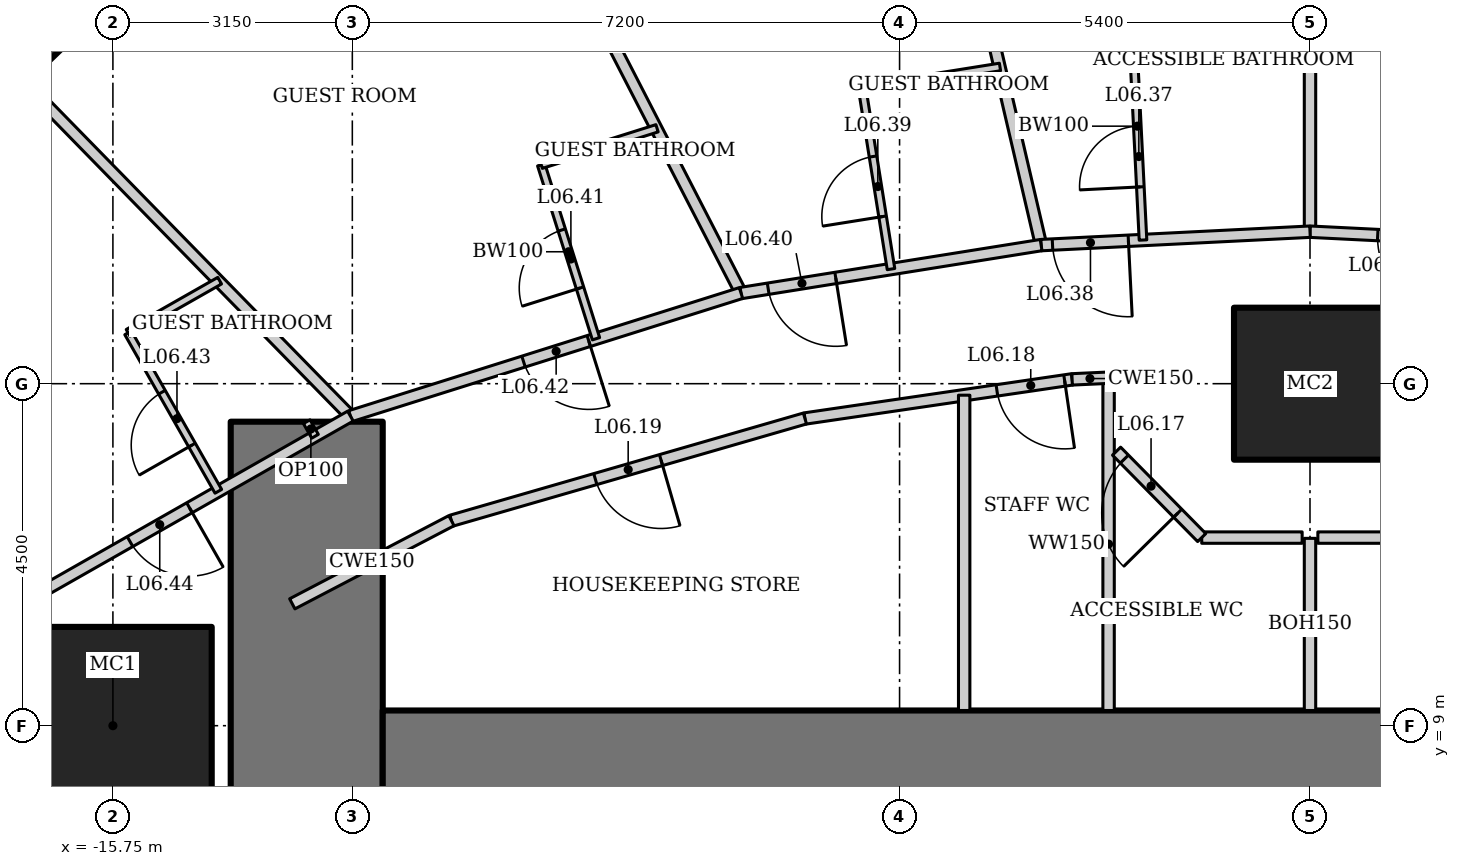
"""IFC4 building model, lengths in metres.
Left out: names, types, materials, properties, quantities, classifications, styles, units other than length and angle.
Written with IfcOpenShell. Run it as: python <this file> out.ifc"""

import sys

from ifc_helpers import new_model, si_unit, direction, frame, frame_2d, origin, origin_2d, place, context, subcontext, project, spatial, rectangle, hollow_rectangle, extrude, element, fill, save


model = new_model("IFC4")
c1 = context("Model", 3, precision=1e-05, world=origin(), true_north=direction((0.0, 1.0)))
c2 = subcontext(c1, "Body", "Model", "MODEL_VIEW")
j1 = project(units=[si_unit("LENGTHUNIT", "METRE"), si_unit("PLANEANGLEUNIT", "RADIAN")], contexts=[c1])
p1 = place(None, origin())
s1 = spatial("IfcSite", under=j1, at=p1, CompositionType="ELEMENT")
p2 = place(p1, origin())
s2 = spatial("IfcBuilding", under=s1, at=p2, CompositionType="ELEMENT")
p3 = place(p2, frame((0.0, 0.0, 37.0)))
s3 = spatial("IfcBuildingStorey", under=s2, at=p3, CompositionType="ELEMENT", Elevation=37.0)
p4 = place(p3, frame((0.0, 13.5, 0.0), z_axis=(0.0, 0.0, 1.0), x_axis=(1.0, 0.0, 0.0)))
e1 = element("IfcColumn", 1, at=p4, inside=s3, PredefinedType="COLUMN", context=c2, shape_type="SweptSolid", body=[
    extrude(hollow_rectangle(XDim=2.0, YDim=2.0, WallThickness=0.17, at=origin_2d()), origin(), (0.0, 0.0, 1.0), 3.6),
])
p5 = place(p3, frame((-15.75, 9.0, 0.0), z_axis=(0.0, 0.0, 1.0), x_axis=(1.0, 0.0, 0.0)))
e2 = element("IfcColumn", 2, at=p5, inside=s3, PredefinedType="COLUMN", context=c2, shape_type="SweptSolid", body=[
    extrude(hollow_rectangle(XDim=2.6, YDim=2.6, WallThickness=0.13, at=origin_2d()), origin(), (0.0, 0.0, 1.0), 3.6),
])
p6 = place(p3, frame((-17.291, 17.905, 0.0), z_axis=(0.0, 0.0, 1.0), x_axis=(0.719339800339, 0.694658370459, 0.0)))
e3 = element("IfcColumn", 3, at=p6, inside=s3, PredefinedType="COLUMN", context=c2, shape_type="SweptSolid", body=[
    extrude(hollow_rectangle(XDim=1.2, YDim=1.2, WallThickness=0.1, at=origin_2d()), origin(), (0.0, 0.0, 1.0), 3.6),
])
p7 = place(p3, frame((-13.2, 13.0, 0.0), z_axis=(0.0, 0.0, 1.0), x_axis=(0.0, -1.0, 0.0)))
e4 = element("IfcWall", 4, at=p7, inside=s3, PredefinedType="SHEAR", context=c2, shape_type="SweptSolid", body=[
    extrude(rectangle(XDim=26.0, YDim=2.0, at=frame_2d((13.0, 0.0))), origin(), (0.0, 0.0, 1.0), 3.6),
])
p8 = place(p7, frame((12.1, 0.0, 0.0)))
e5 = element("IfcOpeningElement", 5, at=p8, cuts=e4, PredefinedType="OPENING", context=c2, shape_type="SweptSolid", body=[
    extrude(rectangle(XDim=1.8, YDim=2.1, at=frame_2d((0.9, 1.05))), frame((0.0, 1.01, 0.0), z_axis=(0.0, -1.0, 0.0), x_axis=(1.0, 0.0, 0.0)), (0.0, 0.0, 1.0), 2.02),
])
p9 = place(p3, frame((12.2, 8.0, 0.0), z_axis=(0.0, 0.0, 1.0), x_axis=(-1.0, 0.0, 0.0)))
e6 = element("IfcWall", 6, at=p9, inside=s3, PredefinedType="SHEAR", context=c2, shape_type="SweptSolid", body=[
    extrude(rectangle(XDim=24.4, YDim=2.4, at=frame_2d((12.2, 0.0))), origin(), (0.0, 0.0, 1.0), 3.6),
])
p10 = place(p3, frame((0.0, 22.825, 0.0), z_axis=(0.0, 0.0, 1.0), x_axis=(0.0, -1.0, 0.0)))
e7 = element("IfcWall", 7, at=p10, inside=s3, PredefinedType="PARTITIONING", context=c2, shape_type="SweptSolid", body=[
    extrude(rectangle(XDim=7.325, YDim=0.15, at=frame_2d((3.662, 0.0))), origin(), (0.0, 0.0, 1.0), 2.924),
])
p11 = place(p3, frame((-5.211, 22.496, 0.0), z_axis=(0.0, 0.0, 1.0), x_axis=(0.227195035564, -0.973849277771, 0.0)))
e8 = element("IfcWall", 8, at=p11, inside=s3, PredefinedType="PARTITIONING", context=c2, shape_type="SweptSolid", body=[
    extrude(rectangle(XDim=7.365, YDim=0.15, at=frame_2d((3.683, 0.0))), origin(), (0.0, 0.0, 1.0), 2.767),
])
p12 = place(p3, frame((-10.912, 21.346, 0.0), z_axis=(0.0, 0.0, 1.0), x_axis=(0.45777845119, -0.889066302154, 0.0)))
e9 = element("IfcWall", 9, at=p12, inside=s3, PredefinedType="PARTITIONING", context=c2, shape_type="SweptSolid", body=[
    extrude(rectangle(XDim=7.483, YDim=0.15, at=frame_2d((3.742, 0.0))), origin(), (0.0, 0.0, 1.0), 2.528),
])
p13 = place(p3, frame((-17.97, 18.542, 0.0), z_axis=(0.0, 0.0, 1.0), x_axis=(0.699032031211, -0.715090357467, 0.0)))
e10 = element("IfcWall", 10, at=p13, inside=s3, PredefinedType="PARTITIONING", context=c2, shape_type="SweptSolid", body=[
    extrude(rectangle(XDim=7.647, YDim=0.15, at=frame_2d((3.824, 0.0))), origin(), (0.0, 0.0, 1.0), 2.528),
])
p14 = place(p3, frame((3.538, 15.323, 0.0), z_axis=(0.0, 0.0, 1.0), x_axis=(-0.998754057167, 0.049903239295, 0.0)))
e11 = element("IfcWall", 11, at=p14, inside=s3, PredefinedType="PARTITIONING", context=c2, shape_type="SweptSolid", body=[
    extrude(rectangle(XDim=3.542, YDim=0.15, at=frame_2d((1.771, 0.0))), origin(), (0.0, 0.0, 1.0), 3.45),
])
p15 = place(p14, frame((1.75, 0.0, 0.0)))
e12 = element("IfcOpeningElement", 12, at=p15, cuts=e11, PredefinedType="OPENING", context=c2, shape_type="SweptSolid", body=[
    extrude(rectangle(XDim=0.9, YDim=2.1, at=frame_2d((0.45, 1.05))), frame((0.0, 0.085, 0.0), z_axis=(0.0, -1.0, 0.0), x_axis=(1.0, 0.0, 0.0)), (0.0, 0.0, 1.0), 0.17),
])
p16 = place(p3, frame((0.0, 15.5, 0.0), z_axis=(0.0, 0.0, 1.0), x_axis=(-0.998754057167, -0.049903239295, 0.0)))
e13 = element("IfcWall", 13, at=p16, inside=s3, PredefinedType="PARTITIONING", context=c2, shape_type="SweptSolid", body=[
    extrude(rectangle(XDim=3.542, YDim=0.15, at=frame_2d((1.771, 0.0))), origin(), (0.0, 0.0, 1.0), 3.45),
])
p17 = place(p16, frame((2.392, 0.0, 0.0)))
e14 = element("IfcOpeningElement", 14, at=p17, cuts=e13, PredefinedType="OPENING", context=c2, shape_type="SweptSolid", body=[
    extrude(rectangle(XDim=1.0, YDim=2.1, at=frame_2d((0.5, 1.05))), frame((0.0, 0.085, 0.0), z_axis=(0.0, -1.0, 0.0), x_axis=(1.0, 0.0, 0.0)), (0.0, 0.0, 1.0), 0.17),
])
p18 = place(p3, frame((-3.538, 15.323, 0.0), z_axis=(0.0, 0.0, 1.0), x_axis=(-0.987475660646, -0.157771415761, 0.0)))
e15 = element("IfcWall", 15, at=p18, inside=s3, PredefinedType="PARTITIONING", context=c2, shape_type="SweptSolid", body=[
    extrude(rectangle(XDim=3.999, YDim=0.15, at=frame_2d((1.999, 0.0))), origin(), (0.0, 0.0, 1.0), 3.45),
])
p19 = place(p18, frame((2.736, 0.0, 0.0)))
e16 = element("IfcOpeningElement", 16, at=p19, cuts=e15, PredefinedType="OPENING", context=c2, shape_type="SweptSolid", body=[
    extrude(rectangle(XDim=0.9, YDim=2.1, at=frame_2d((0.45, 1.05))), frame((0.0, 0.085, 0.0), z_axis=(0.0, -1.0, 0.0), x_axis=(1.0, 0.0, 0.0)), (0.0, 0.0, 1.0), 0.17),
])
p20 = place(p3, frame((-7.486, 14.692, 0.0), z_axis=(0.0, 0.0, 1.0), x_axis=(-0.953774229808, -0.30052407317, 0.0)))
e17 = element("IfcWall", 17, at=p20, inside=s3, PredefinedType="PARTITIONING", context=c2, shape_type="SweptSolid", body=[
    extrude(rectangle(XDim=5.388, YDim=0.15, at=frame_2d((2.694, 0.0))), origin(), (0.0, 0.0, 1.0), 3.45),
])
p21 = place(p20, frame((2.1, 0.0, 0.0)))
e18 = element("IfcOpeningElement", 18, at=p21, cuts=e17, PredefinedType="OPENING", context=c2, shape_type="SweptSolid", body=[
    extrude(rectangle(XDim=0.9, YDim=2.1, at=frame_2d((0.45, 1.05))), frame((0.0, 0.085, 0.0), z_axis=(0.0, -1.0, 0.0), x_axis=(1.0, 0.0, 0.0)), (0.0, 0.0, 1.0), 0.17),
])
p22 = place(p3, frame((-12.625, 13.073, 0.0), z_axis=(0.0, 0.0, 1.0), x_axis=(-0.86907565943, -0.494679187136, 0.0)))
e19 = element("IfcWall", 19, at=p22, inside=s3, PredefinedType="PARTITIONING", context=c2, shape_type="SweptSolid", body=[
    extrude(rectangle(XDim=5.911, YDim=0.15, at=frame_2d((2.955, 0.0))), origin(), (0.0, 0.0, 1.0), 3.45),
])
p23 = place(p22, frame((2.437, 0.0, 0.0)))
e20 = element("IfcOpeningElement", 20, at=p23, cuts=e19, PredefinedType="OPENING", context=c2, shape_type="SweptSolid", body=[
    extrude(rectangle(XDim=0.9, YDim=2.1, at=frame_2d((0.45, 1.05))), frame((0.0, 0.085, 0.0), z_axis=(0.0, -1.0, 0.0), x_axis=(1.0, 0.0, 0.0)), (0.0, 0.0, 1.0), 0.17),
])
p24 = place(p3, frame((-3.13, 13.557, 0.0), z_axis=(0.0, 0.0, 1.0), x_axis=(-0.989443047021, -0.14492224364, 0.0)))
e21 = element("IfcWall", 21, at=p24, inside=s3, PredefinedType="PARTITIONING", context=c2, shape_type="SweptSolid", body=[
    extrude(rectangle(XDim=3.553, YDim=0.15, at=frame_2d((1.776, 0.0))), origin(), (0.0, 0.0, 1.0), 3.45),
])
p25 = place(p24, frame((0.1, 0.0, 0.0)))
e22 = element("IfcOpeningElement", 22, at=p25, cuts=e21, PredefinedType="OPENING", context=c2, shape_type="SweptSolid", body=[
    extrude(rectangle(XDim=0.9, YDim=2.1, at=frame_2d((0.45, 1.05))), frame((0.0, 0.085, 0.0), z_axis=(0.0, -1.0, 0.0), x_axis=(1.0, 0.0, 0.0)), (0.0, 0.0, 1.0), 0.17),
])
p26 = place(p3, frame((-6.645, 13.042, 0.0), z_axis=(0.0, 0.0, 1.0), x_axis=(-0.960678318068, -0.277663770041, 0.0)))
e23 = element("IfcWall", 23, at=p26, inside=s3, PredefinedType="PARTITIONING", context=c2, shape_type="SweptSolid", body=[
    extrude(rectangle(XDim=4.841, YDim=0.15, at=frame_2d((2.421, 0.0))), origin(), (0.0, 0.0, 1.0), 3.45),
])
p27 = place(p26, frame((1.971, 0.0, 0.0)))
e24 = element("IfcOpeningElement", 24, at=p27, cuts=e23, PredefinedType="OPENING", context=c2, shape_type="SweptSolid", body=[
    extrude(rectangle(XDim=0.9, YDim=2.1, at=frame_2d((0.45, 1.05))), frame((0.0, 0.085, 0.0), z_axis=(0.0, -1.0, 0.0), x_axis=(1.0, 0.0, 0.0)), (0.0, 0.0, 1.0), 0.17),
])
p28 = place(p3, frame((-2.65, 9.2, 0.0), z_axis=(0.0, 0.0, 1.0), x_axis=(0.0, 1.0, 0.0)))
e25 = element("IfcWall", 25, at=p28, inside=s3, PredefinedType="SOLIDWALL", context=c2, shape_type="SweptSolid", body=[
    extrude(rectangle(XDim=4.379, YDim=0.15, at=frame_2d((2.189, 0.0))), origin(), (0.0, 0.0, 1.0), 2.767),
])
p29 = place(p3, frame((-4.55, 9.2, 0.0), z_axis=(0.0, 0.0, 1.0), x_axis=(0.0, 1.0, 0.0)))
e26 = element("IfcWall", 26, at=p29, inside=s3, PredefinedType="SOLIDWALL", context=c2, shape_type="SweptSolid", body=[
    extrude(rectangle(XDim=4.149, YDim=0.15, at=frame_2d((2.074, 0.0))), origin(), (0.0, 0.0, 1.0), 3.45),
])
p30 = place(p3, frame((-2.197, 15.39, 0.0), z_axis=(0.0, 0.0, 1.0), x_axis=(-0.049888907753, 0.998754773147, 0.0)))
e27 = element("IfcWall", 27, at=p30, inside=s3, PredefinedType="PARTITIONING", context=c2, shape_type="SweptSolid", body=[
    extrude(rectangle(XDim=3.0, YDim=0.1, at=frame_2d((1.5, 0.0))), origin(), (0.0, 0.0, 1.0), 3.45),
])
p31 = place(p30, frame((0.7, 0.0, 0.0)))
e28 = element("IfcOpeningElement", 28, at=p31, cuts=e27, PredefinedType="OPENING", context=c2, shape_type="SweptSolid", body=[
    extrude(rectangle(XDim=0.8, YDim=2.1, at=frame_2d((0.4, 1.05))), frame((0.0, 0.06, 0.0), z_axis=(0.0, -1.0, 0.0), x_axis=(1.0, 0.0, 0.0)), (0.0, 0.0, 1.0), 0.12),
])
p32 = place(p3, frame((-5.513, 15.008, 0.0), z_axis=(0.0, 0.0, 1.0), x_axis=(-0.157780217218, 0.987474254376, 0.0)))
e29 = element("IfcWall", 29, at=p32, inside=s3, PredefinedType="PARTITIONING", context=c2, shape_type="SweptSolid", body=[
    extrude(rectangle(XDim=2.4, YDim=0.1, at=frame_2d((1.2, 0.0))), origin(), (0.0, 0.0, 1.0), 3.45),
])
p33 = place(p32, frame((0.7, 0.0, 0.0)))
e30 = element("IfcOpeningElement", 30, at=p33, cuts=e29, PredefinedType="OPENING", context=c2, shape_type="SweptSolid", body=[
    extrude(rectangle(XDim=0.8, YDim=2.1, at=frame_2d((0.4, 1.05))), frame((0.0, 0.06, 0.0), z_axis=(0.0, -1.0, 0.0), x_axis=(1.0, 0.0, 0.0)), (0.0, 0.0, 1.0), 0.12),
])
p34 = place(p3, frame((-5.891, 17.378, 0.0), z_axis=(0.0, 0.0, 1.0), x_axis=(0.987478784284, 0.157751863976, 0.0)))
e31 = element("IfcWall", 31, at=p34, inside=s3, PredefinedType="PARTITIONING", context=c2, shape_type="SweptSolid", body=[
    extrude(rectangle(XDim=1.835, YDim=0.1, at=frame_2d((0.918, 0.0))), origin(), (0.0, 0.0, 1.0), 3.45),
])
p35 = place(p3, frame((-9.394, 14.091, 0.0), z_axis=(0.0, 0.0, 1.0), x_axis=(-0.30049839721, 0.953782319649, 0.0)))
e32 = element("IfcWall", 32, at=p35, inside=s3, PredefinedType="PARTITIONING", context=c2, shape_type="SweptSolid", body=[
    extrude(rectangle(XDim=2.4, YDim=0.1, at=frame_2d((1.2, 0.0))), origin(), (0.0, 0.0, 1.0), 3.45),
])
p36 = place(p35, frame((0.7, 0.0, 0.0)))
e33 = element("IfcOpeningElement", 33, at=p36, cuts=e32, PredefinedType="OPENING", context=c2, shape_type="SweptSolid", body=[
    extrude(rectangle(XDim=0.8, YDim=2.1, at=frame_2d((0.4, 1.05))), frame((0.0, 0.06, 0.0), z_axis=(0.0, -1.0, 0.0), x_axis=(1.0, 0.0, 0.0)), (0.0, 0.0, 1.0), 0.12),
])
p37 = place(p3, frame((-10.115, 16.38, 0.0), z_axis=(0.0, 0.0, 1.0), x_axis=(0.953764923986, 0.300553605492, 0.0)))
e34 = element("IfcWall", 34, at=p37, inside=s3, PredefinedType="PARTITIONING", context=c2, shape_type="SweptSolid", body=[
    extrude(rectangle(XDim=1.598, YDim=0.1, at=frame_2d((0.799, 0.0))), origin(), (0.0, 0.0, 1.0), 3.45),
])
p38 = place(p3, frame((-14.363, 12.084, 0.0), z_axis=(0.0, 0.0, 1.0), x_axis=(-0.494703113698, 0.869062039959, 0.0)))
e35 = element("IfcWall", 35, at=p38, inside=s3, PredefinedType="PARTITIONING", context=c2, shape_type="SweptSolid", body=[
    extrude(rectangle(XDim=2.4, YDim=0.1, at=frame_2d((1.2, 0.0))), origin(), (0.0, 0.0, 1.0), 3.45),
])
p39 = place(p38, frame((0.7, 0.0, 0.0)))
e36 = element("IfcOpeningElement", 36, at=p39, cuts=e35, PredefinedType="OPENING", context=c2, shape_type="SweptSolid", body=[
    extrude(rectangle(XDim=0.8, YDim=2.1, at=frame_2d((0.4, 1.05))), frame((0.0, 0.06, 0.0), z_axis=(0.0, -1.0, 0.0), x_axis=(1.0, 0.0, 0.0)), (0.0, 0.0, 1.0), 0.12),
])
p40 = place(p3, frame((-15.55, 14.17, 0.0), z_axis=(0.0, 0.0, 1.0), x_axis=(0.869065896633, 0.494696338485, 0.0)))
e37 = element("IfcWall", 37, at=p40, inside=s3, PredefinedType="PARTITIONING", context=c2, shape_type="SweptSolid", body=[
    extrude(rectangle(XDim=1.386, YDim=0.1, at=frame_2d((0.693, 0.0))), origin(), (0.0, 0.0, 1.0), 3.45),
])
p41 = place(p3, frame((-13.2, 13.0, 0.0), z_axis=(0.0, 0.0, 1.0), x_axis=(0.49435138335, -0.869262164011, 0.0)))
e38 = element("IfcWall", 38, at=p41, inside=s3, PredefinedType="PARTITIONING", context=c2, shape_type="SweptSolid", body=[
    extrude(rectangle(XDim=0.221, YDim=0.1, at=frame_2d((0.11, 0.0))), origin(), (0.0, 0.0, 1.0), 3.45),
])
p42 = place(p3, frame((-11.296, 11.698, 0.0), z_axis=(0.0, 0.0, 1.0), x_axis=(-0.886306431218, -0.463099244203, 0.0)))
e39 = element("IfcWall", 39, at=p42, inside=s3, PredefinedType="PARTITIONING", context=c2, shape_type="SweptSolid", body=[
    extrude(rectangle(XDim=2.362, YDim=0.15, at=frame_2d((1.181, 0.0))), origin(), (0.0, 0.0, 1.0), 3.45),
])
p43 = place(p3, frame((-2.66, 13.578, 0.0), z_axis=(0.0, 0.0, 1.0), x_axis=(-0.998932929821, -0.046184431561, 0.0)))
e40 = element("IfcWall", 40, at=p43, inside=s3, PredefinedType="PARTITIONING", context=c2, shape_type="SweptSolid", body=[
    extrude(rectangle(XDim=0.47, YDim=0.15, at=frame_2d((0.235, 0.0))), origin(), (0.0, 0.0, 1.0), 3.45),
])
p44 = place(p3, frame((0.0, 9.2, 0.0), z_axis=(0.0, 0.0, 1.0), x_axis=(0.0, 1.0, 0.0)))
e41 = element("IfcWall", 41, at=p44, inside=s3, PredefinedType="PARTITIONING", context=c2, shape_type="SweptSolid", body=[
    extrude(rectangle(XDim=2.265, YDim=0.15, at=frame_2d((1.133, 0.0))), origin(), (0.0, 0.0, 1.0), 3.044),
])
for number, where, z_axis, x_axis in (
    (42, (1.425, 11.475, 0.0), (0.0, 0.0, 1.0), (-1.0, 0.0, 0.0)),
    (43, (-0.103, 11.475, 0.0), (0.0, 0.0, 1.0), (-1.0, 0.0, 0.0)),
):
    element("IfcWall", number, at=place(p3, frame(where, z_axis=z_axis, x_axis=x_axis)), inside=s3, PredefinedType="PARTITIONING", context=c2, shape_type="SweptSolid", body=[
        extrude(rectangle(XDim=1.321, YDim=0.15, at=frame_2d((0.661, 0.0))), origin(), (0.0, 0.0, 1.0), 3.45),
    ])
p45 = place(p3, frame((-1.425, 11.475, 0.0), z_axis=(0.0, 0.0, 1.0), x_axis=(-0.701810897552, 0.71236329501, 0.0)))
e44 = element("IfcWall", 44, at=p45, inside=s3, PredefinedType="PARTITIONING", context=c2, shape_type="SweptSolid", body=[
    extrude(rectangle(XDim=1.596, YDim=0.15, at=frame_2d((0.798, 0.0))), origin(), (0.0, 0.0, 1.0), 3.45),
])
p46 = place(p45, frame((0.45, 0.0, 0.0)))
e45 = element("IfcOpeningElement", 45, at=p46, cuts=e44, PredefinedType="OPENING", context=c2, shape_type="SweptSolid", body=[
    extrude(rectangle(XDim=1.0, YDim=2.1, at=frame_2d((0.5, 1.05))), frame((0.0, 0.085, 0.0), z_axis=(0.0, -1.0, 0.0), x_axis=(1.0, 0.0, 0.0)), (0.0, 0.0, 1.0), 0.17),
])
p47 = place(p3, frame((-2.545, 13.583, 0.0), z_axis=(0.0, 0.0, 1.0), x_axis=(0.998945224079, 0.045917744822, 0.0)))
e46 = element("IfcWall", 46, at=p47, inside=s3, PredefinedType="PARTITIONING", context=c2, shape_type="SweptSolid", body=[
    extrude(rectangle(XDim=0.521, YDim=0.15, at=frame_2d((0.26, 0.0))), origin(), (0.0, 0.0, 1.0), 3.45),
])
p48 = place(p46, origin())
e47 = element("IfcDoor", 47, at=p48, inside=s3, OperationType="SINGLE_SWING_LEFT", PredefinedType="DOOR", context=c2, shape_type="SweptSolid", body=[
    extrude(rectangle(XDim=1.0, YDim=2.1, at=frame_2d((0.5, 1.05))), frame((0.0, 0.025, 0.0), z_axis=(0.0, -1.0, 0.0), x_axis=(1.0, 0.0, 0.0)), (0.0, 0.0, 1.0), 0.05),
])
fill(e45, e47)
p49 = place(p25, origin())
e48 = element("IfcDoor", 48, at=p49, inside=s3, OperationType="SINGLE_SWING_LEFT", PredefinedType="DOOR", context=c2, shape_type="SweptSolid", body=[
    extrude(rectangle(XDim=0.9, YDim=2.1, at=frame_2d((0.45, 1.05))), frame((0.0, 0.025, 0.0), z_axis=(0.0, -1.0, 0.0), x_axis=(1.0, 0.0, 0.0)), (0.0, 0.0, 1.0), 0.05),
])
fill(e22, e48)
p50 = place(p27, origin())
e49 = element("IfcDoor", 49, at=p50, inside=s3, OperationType="SINGLE_SWING_LEFT", PredefinedType="DOOR", context=c2, shape_type="SweptSolid", body=[
    extrude(rectangle(XDim=0.9, YDim=2.1, at=frame_2d((0.45, 1.05))), frame((0.0, 0.025, 0.0), z_axis=(0.0, -1.0, 0.0), x_axis=(1.0, 0.0, 0.0)), (0.0, 0.0, 1.0), 0.05),
])
fill(e24, e49)
p51 = place(p15, origin())
e50 = element("IfcDoor", 50, at=p51, inside=s3, OperationType="SINGLE_SWING_LEFT", PredefinedType="DOOR", context=c2, shape_type="SweptSolid", body=[
    extrude(rectangle(XDim=0.9, YDim=2.1, at=frame_2d((0.45, 1.05))), frame((0.0, 0.025, 0.0), z_axis=(0.0, -1.0, 0.0), x_axis=(1.0, 0.0, 0.0)), (0.0, 0.0, 1.0), 0.05),
])
fill(e12, e50)
p52 = place(p31, origin())
e51 = element("IfcDoor", 51, at=p52, inside=s3, OperationType="SINGLE_SWING_LEFT", PredefinedType="DOOR", context=c2, shape_type="SweptSolid", body=[
    extrude(rectangle(XDim=0.8, YDim=2.1, at=frame_2d((0.4, 1.05))), frame((0.0, 0.025, 0.0), z_axis=(0.0, -1.0, 0.0), x_axis=(1.0, 0.0, 0.0)), (0.0, 0.0, 1.0), 0.05),
])
fill(e28, e51)
p53 = place(p17, origin())
e52 = element("IfcDoor", 52, at=p53, inside=s3, OperationType="SINGLE_SWING_LEFT", PredefinedType="DOOR", context=c2, shape_type="SweptSolid", body=[
    extrude(rectangle(XDim=1.0, YDim=2.1, at=frame_2d((0.5, 1.05))), frame((0.0, 0.025, 0.0), z_axis=(0.0, -1.0, 0.0), x_axis=(1.0, 0.0, 0.0)), (0.0, 0.0, 1.0), 0.05),
])
fill(e14, e52)
p54 = place(p33, origin())
e53 = element("IfcDoor", 53, at=p54, inside=s3, OperationType="SINGLE_SWING_LEFT", PredefinedType="DOOR", context=c2, shape_type="SweptSolid", body=[
    extrude(rectangle(XDim=0.8, YDim=2.1, at=frame_2d((0.4, 1.05))), frame((0.0, 0.025, 0.0), z_axis=(0.0, -1.0, 0.0), x_axis=(1.0, 0.0, 0.0)), (0.0, 0.0, 1.0), 0.05),
])
fill(e30, e53)
p55 = place(p19, origin())
e54 = element("IfcDoor", 54, at=p55, inside=s3, OperationType="SINGLE_SWING_LEFT", PredefinedType="DOOR", context=c2, shape_type="SweptSolid", body=[
    extrude(rectangle(XDim=0.9, YDim=2.1, at=frame_2d((0.45, 1.05))), frame((0.0, 0.025, 0.0), z_axis=(0.0, -1.0, 0.0), x_axis=(1.0, 0.0, 0.0)), (0.0, 0.0, 1.0), 0.05),
])
fill(e16, e54)
p56 = place(p36, origin())
e55 = element("IfcDoor", 55, at=p56, inside=s3, OperationType="SINGLE_SWING_LEFT", PredefinedType="DOOR", context=c2, shape_type="SweptSolid", body=[
    extrude(rectangle(XDim=0.8, YDim=2.1, at=frame_2d((0.4, 1.05))), frame((0.0, 0.025, 0.0), z_axis=(0.0, -1.0, 0.0), x_axis=(1.0, 0.0, 0.0)), (0.0, 0.0, 1.0), 0.05),
])
fill(e33, e55)
p57 = place(p21, origin())
e56 = element("IfcDoor", 56, at=p57, inside=s3, OperationType="SINGLE_SWING_LEFT", PredefinedType="DOOR", context=c2, shape_type="SweptSolid", body=[
    extrude(rectangle(XDim=0.9, YDim=2.1, at=frame_2d((0.45, 1.05))), frame((0.0, 0.025, 0.0), z_axis=(0.0, -1.0, 0.0), x_axis=(1.0, 0.0, 0.0)), (0.0, 0.0, 1.0), 0.05),
])
fill(e18, e56)
p58 = place(p39, origin())
e57 = element("IfcDoor", 57, at=p58, inside=s3, OperationType="SINGLE_SWING_LEFT", PredefinedType="DOOR", context=c2, shape_type="SweptSolid", body=[
    extrude(rectangle(XDim=0.8, YDim=2.1, at=frame_2d((0.4, 1.05))), frame((0.0, 0.025, 0.0), z_axis=(0.0, -1.0, 0.0), x_axis=(1.0, 0.0, 0.0)), (0.0, 0.0, 1.0), 0.05),
])
fill(e36, e57)
p59 = place(p23, origin())
e58 = element("IfcDoor", 58, at=p59, inside=s3, OperationType="SINGLE_SWING_LEFT", PredefinedType="DOOR", context=c2, shape_type="SweptSolid", body=[
    extrude(rectangle(XDim=0.9, YDim=2.1, at=frame_2d((0.45, 1.05))), frame((0.0, 0.025, 0.0), z_axis=(0.0, -1.0, 0.0), x_axis=(1.0, 0.0, 0.0)), (0.0, 0.0, 1.0), 0.05),
])
fill(e20, e58)
save(model, sys.argv[1])
